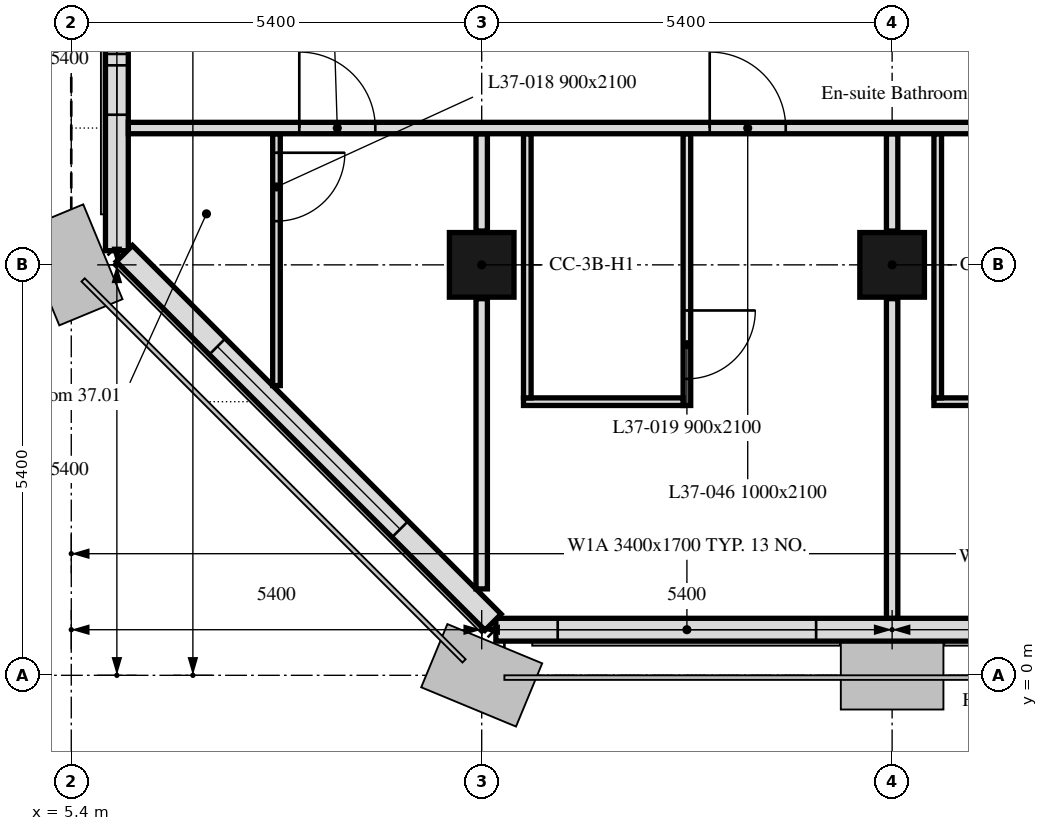
"""IFC4 building model, lengths in metres.
Left out: names, types, materials, properties, quantities, classifications, styles, units other than length and angle.
Written with IfcOpenShell. Run it as: python <this file> out.ifc"""

import sys

from ifc_helpers import new_model, si_unit, direction, frame, frame_2d, origin, origin_2d, place, context, subcontext, project, spatial, rectangle, extrude, element, fill, save


model = new_model("IFC4")
c1 = context("Model", 3, precision=1e-05, world=origin(), true_north=direction((0.0, 1.0)))
c2 = subcontext(c1, "Body", "Model", "MODEL_VIEW")
j1 = project(units=[si_unit("LENGTHUNIT", "METRE"), si_unit("PLANEANGLEUNIT", "RADIAN")], contexts=[c1])
p1 = place(None, origin())
s1 = spatial("IfcSite", under=j1, at=p1, CompositionType="ELEMENT")
p2 = place(p1, origin())
s2 = spatial("IfcBuilding", under=s1, at=p2, CompositionType="ELEMENT")
p3 = place(p2, frame((0.0, 0.0, 159.4)))
s3 = spatial("IfcBuildingStorey", under=s2, at=p3, CompositionType="ELEMENT", Elevation=159.4)
for number, where, z_axis, x_axis in (
    (1, (10.8, 5.4, 0.0), (0.0, 0.0, 1.0), (1.0, 0.0, 0.0)),
    (2, (16.2, 5.4, 0.0), (0.0, 0.0, 1.0), (1.0, 0.0, 0.0)),
):
    element("IfcColumn", number, at=place(p3, frame(where, z_axis=z_axis, x_axis=x_axis)), inside=s3, PredefinedType="COLUMN", context=c2, shape_type="SweptSolid", body=[
        extrude(rectangle(XDim=0.85, YDim=0.85, at=origin_2d()), origin(), (0.0, 0.0, 1.0), 3.0),
    ])
p4 = place(p3, frame((10.986, 0.6, 0.0), z_axis=(0.0, 0.0, 1.0), x_axis=(1.0, 0.0, 0.0)))
e3 = element("IfcWall", 3, at=p4, inside=s3, PredefinedType="SOLIDWALL", context=c2, shape_type="SweptSolid", body=[
    extrude(rectangle(XDim=32.027, YDim=0.3, at=frame_2d((16.014, 0.0))), origin(), (0.0, 0.0, 1.0), 3.0),
])
p5 = place(p4, frame((0.814, 0.0, 0.9)))
e4 = element("IfcOpeningElement", 4, at=p5, cuts=e3, PredefinedType="OPENING", context=c2, shape_type="SweptSolid", body=[
    extrude(rectangle(XDim=3.4, YDim=1.7, at=frame_2d((1.7, 0.85))), frame((0.0, 0.16, 0.0), z_axis=(0.0, -1.0, 0.0), x_axis=(1.0, 0.0, 0.0)), (0.0, 0.0, 1.0), 0.32),
])
p6 = place(p4, frame((6.564, 0.0, 0.9)))
e5 = element("IfcOpeningElement", 5, at=p6, cuts=e3, PredefinedType="OPENING", context=c2, shape_type="SweptSolid", body=[
    extrude(rectangle(XDim=1.1, YDim=1.7, at=frame_2d((0.55, 0.85))), frame((0.0, 0.16, 0.0), z_axis=(0.0, -1.0, 0.0), x_axis=(1.0, 0.0, 0.0)), (0.0, 0.0, 1.0), 0.32),
])
p7 = place(p4, frame((11.614, 0.0, 0.9)))
e6 = element("IfcOpeningElement", 6, at=p7, cuts=e3, PredefinedType="OPENING", context=c2, shape_type="SweptSolid", body=[
    extrude(rectangle(XDim=3.4, YDim=1.7, at=frame_2d((1.7, 0.85))), frame((0.0, 0.16, 0.0), z_axis=(0.0, -1.0, 0.0), x_axis=(1.0, 0.0, 0.0)), (0.0, 0.0, 1.0), 0.32),
])
p8 = place(p4, frame((17.364, 0.0, 0.9)))
e7 = element("IfcOpeningElement", 7, at=p8, cuts=e3, PredefinedType="OPENING", context=c2, shape_type="SweptSolid", body=[
    extrude(rectangle(XDim=1.1, YDim=1.7, at=frame_2d((0.55, 0.85))), frame((0.0, 0.16, 0.0), z_axis=(0.0, -1.0, 0.0), x_axis=(1.0, 0.0, 0.0)), (0.0, 0.0, 1.0), 0.32),
])
p9 = place(p4, frame((22.414, 0.0, 0.9)))
e8 = element("IfcOpeningElement", 8, at=p9, cuts=e3, PredefinedType="OPENING", context=c2, shape_type="SweptSolid", body=[
    extrude(rectangle(XDim=3.4, YDim=1.7, at=frame_2d((1.7, 0.85))), frame((0.0, 0.16, 0.0), z_axis=(0.0, -1.0, 0.0), x_axis=(1.0, 0.0, 0.0)), (0.0, 0.0, 1.0), 0.32),
])
p10 = place(p4, frame((28.164, 0.0, 0.9)))
e9 = element("IfcOpeningElement", 9, at=p10, cuts=e3, PredefinedType="OPENING", context=c2, shape_type="SweptSolid", body=[
    extrude(rectangle(XDim=1.1, YDim=1.7, at=frame_2d((0.55, 0.85))), frame((0.0, 0.16, 0.0), z_axis=(0.0, -1.0, 0.0), x_axis=(1.0, 0.0, 0.0)), (0.0, 0.0, 1.0), 0.32),
])
p11 = place(p3, frame((6.0, 16.2, 0.0), z_axis=(0.0, 0.0, 1.0), x_axis=(0.0, -1.0, 0.0)))
e10 = element("IfcWall", 10, at=p11, inside=s3, PredefinedType="SOLIDWALL", context=c2, shape_type="SweptSolid", body=[
    extrude(rectangle(XDim=10.614, YDim=0.3, at=frame_2d((5.307, 0.0))), origin(), (0.0, 0.0, 1.0), 3.0),
])
p12 = place(p11, frame((1.0, 0.0, 0.9)))
e11 = element("IfcOpeningElement", 11, at=p12, cuts=e10, PredefinedType="OPENING", context=c2, shape_type="SweptSolid", body=[
    extrude(rectangle(XDim=3.4, YDim=1.7, at=frame_2d((1.7, 0.85))), frame((0.0, 0.16, 0.0), z_axis=(0.0, -1.0, 0.0), x_axis=(1.0, 0.0, 0.0)), (0.0, 0.0, 1.0), 0.32),
])
p13 = place(p11, frame((7.375, 0.0, 0.9)))
e12 = element("IfcOpeningElement", 12, at=p13, cuts=e10, PredefinedType="OPENING", context=c2, shape_type="SweptSolid", body=[
    extrude(rectangle(XDim=0.65, YDim=1.7, at=frame_2d((0.325, 0.85))), frame((0.0, 0.16, 0.0), z_axis=(0.0, -1.0, 0.0), x_axis=(1.0, 0.0, 0.0)), (0.0, 0.0, 1.0), 0.32),
])
p14 = place(p11, frame((8.175, 0.0, 0.9)))
e13 = element("IfcOpeningElement", 13, at=p14, cuts=e10, PredefinedType="OPENING", context=c2, shape_type="SweptSolid", body=[
    extrude(rectangle(XDim=0.65, YDim=1.7, at=frame_2d((0.325, 0.85))), frame((0.0, 0.16, 0.0), z_axis=(0.0, -1.0, 0.0), x_axis=(1.0, 0.0, 0.0)), (0.0, 0.0, 1.0), 0.32),
])
p15 = place(p3, frame((6.099, 5.55, 0.0), z_axis=(0.0, 0.0, 1.0), x_axis=(0.707106781187, -0.707106781187, 0.0)))
e14 = element("IfcWall", 14, at=p15, inside=s3, PredefinedType="SOLIDWALL", context=c2, shape_type="SweptSolid", body=[
    extrude(rectangle(XDim=6.86, YDim=0.3, at=frame_2d((3.43, 0.0))), origin(), (0.0, 0.0, 1.0), 3.0),
])
p16 = place(p15, frame((1.73, 0.0, 0.9)))
e15 = element("IfcOpeningElement", 15, at=p16, cuts=e14, PredefinedType="OPENING", context=c2, shape_type="SweptSolid", body=[
    extrude(rectangle(XDim=3.4, YDim=1.7, at=frame_2d((1.7, 0.85))), frame((0.0, 0.16, 0.0), z_axis=(0.0, -1.0, 0.0), x_axis=(1.0, 0.0, 0.0)), (0.0, 0.0, 1.0), 0.32),
])
p17 = place(p3, frame((10.8, 1.137, 0.0), z_axis=(0.0, 0.0, 1.0), x_axis=(0.0, 1.0, 0.0)))
e16 = element("IfcWall", 16, at=p17, inside=s3, PredefinedType="PARTITIONING", context=c2, shape_type="SweptSolid", body=[
    extrude(rectangle(XDim=3.818, YDim=0.15, at=frame_2d((1.909, 0.0))), origin(), (0.0, 0.0, 1.0), 3.0),
])
p18 = place(p3, frame((10.8, 5.845, 0.0), z_axis=(0.0, 0.0, 1.0), x_axis=(0.0, 1.0, 0.0)))
e17 = element("IfcWall", 17, at=p18, inside=s3, PredefinedType="PARTITIONING", context=c2, shape_type="SweptSolid", body=[
    extrude(rectangle(XDim=1.28, YDim=0.15, at=frame_2d((0.64, 0.0))), origin(), (0.0, 0.0, 1.0), 3.0),
])
p19 = place(p3, frame((8.1, 7.125, 0.0), z_axis=(0.0, 0.0, 1.0), x_axis=(0.0, -1.0, 0.0)))
e18 = element("IfcWall", 18, at=p19, inside=s3, PredefinedType="PARTITIONING", context=c2, shape_type="SweptSolid", body=[
    extrude(rectangle(XDim=3.313, YDim=0.1, at=frame_2d((1.656, 0.0))), origin(), (0.0, 0.0, 1.0), 3.0),
])
p20 = place(p19, frame((0.25, 0.0, 0.0)))
e19 = element("IfcOpeningElement", 19, at=p20, cuts=e18, PredefinedType="OPENING", context=c2, shape_type="SweptSolid", body=[
    extrude(rectangle(XDim=0.9, YDim=2.1, at=frame_2d((0.45, 1.05))), frame((0.0, 0.05, 0.0), z_axis=(0.0, -1.0, 0.0), x_axis=(1.0, 0.0, 0.0)), (0.0, 0.0, 1.0), 0.1),
])
p21 = place(p3, frame((16.2, 0.751, 0.0), z_axis=(0.0, 0.0, 1.0), x_axis=(0.0, 1.0, 0.0)))
e20 = element("IfcWall", 20, at=p21, inside=s3, PredefinedType="PARTITIONING", context=c2, shape_type="SweptSolid", body=[
    extrude(rectangle(XDim=4.204, YDim=0.15, at=frame_2d((2.102, 0.0))), origin(), (0.0, 0.0, 1.0), 2.4),
])
p22 = place(p3, frame((16.2, 5.845, 0.0), z_axis=(0.0, 0.0, 1.0), x_axis=(0.0, 1.0, 0.0)))
e21 = element("IfcWall", 21, at=p22, inside=s3, PredefinedType="PARTITIONING", context=c2, shape_type="SweptSolid", body=[
    extrude(rectangle(XDim=1.28, YDim=0.15, at=frame_2d((0.64, 0.0))), origin(), (0.0, 0.0, 1.0), 2.4),
])
p23 = place(p3, frame((13.5, 7.125, 0.0), z_axis=(0.0, 0.0, 1.0), x_axis=(0.0, -1.0, 0.0)))
e22 = element("IfcWall", 22, at=p23, inside=s3, PredefinedType="PARTITIONING", context=c2, shape_type="SweptSolid", body=[
    extrude(rectangle(XDim=3.575, YDim=0.1, at=frame_2d((1.788, 0.0))), origin(), (0.0, 0.0, 1.0), 3.0),
])
p24 = place(p23, frame((2.325, 0.0, 0.0)))
e23 = element("IfcOpeningElement", 23, at=p24, cuts=e22, PredefinedType="OPENING", context=c2, shape_type="SweptSolid", body=[
    extrude(rectangle(XDim=0.9, YDim=2.1, at=frame_2d((0.45, 1.05))), frame((0.0, 0.05, 0.0), z_axis=(0.0, -1.0, 0.0), x_axis=(1.0, 0.0, 0.0)), (0.0, 0.0, 1.0), 0.1),
])
p25 = place(p3, frame((13.45, 3.6, 0.0), z_axis=(0.0, 0.0, 1.0), x_axis=(-1.0, 0.0, 0.0)))
e24 = element("IfcWall", 24, at=p25, inside=s3, PredefinedType="PARTITIONING", context=c2, shape_type="SweptSolid", body=[
    extrude(rectangle(XDim=2.1, YDim=0.1, at=frame_2d((1.05, 0.0))), origin(), (0.0, 0.0, 1.0), 3.0),
])
p26 = place(p3, frame((11.4, 3.65, 0.0), z_axis=(0.0, 0.0, 1.0), x_axis=(0.0, 1.0, 0.0)))
e25 = element("IfcWall", 25, at=p26, inside=s3, PredefinedType="PARTITIONING", context=c2, shape_type="SweptSolid", body=[
    extrude(rectangle(XDim=3.475, YDim=0.1, at=frame_2d((1.738, 0.0))), origin(), (0.0, 0.0, 1.0), 3.0),
])
p27 = place(p3, frame((18.85, 3.6, 0.0), z_axis=(0.0, 0.0, 1.0), x_axis=(-1.0, 0.0, 0.0)))
e26 = element("IfcWall", 26, at=p27, inside=s3, PredefinedType="PARTITIONING", context=c2, shape_type="SweptSolid", body=[
    extrude(rectangle(XDim=2.1, YDim=0.1, at=frame_2d((1.05, 0.0))), origin(), (0.0, 0.0, 1.0), 3.0),
])
p28 = place(p3, frame((16.8, 3.65, 0.0), z_axis=(0.0, 0.0, 1.0), x_axis=(0.0, 1.0, 0.0)))
e27 = element("IfcWall", 27, at=p28, inside=s3, PredefinedType="PARTITIONING", context=c2, shape_type="SweptSolid", body=[
    extrude(rectangle(XDim=3.475, YDim=0.1, at=frame_2d((1.738, 0.0))), origin(), (0.0, 0.0, 1.0), 3.0),
])
p29 = place(p3, frame((6.151, 7.2, 0.0), z_axis=(0.0, 0.0, 1.0), x_axis=(1.0, 0.0, 0.0)))
e28 = element("IfcWall", 28, at=p29, inside=s3, PredefinedType="PARTITIONING", context=c2, shape_type="SweptSolid", body=[
    extrude(rectangle(XDim=41.698, YDim=0.15, at=frame_2d((20.849, 0.0))), origin(), (0.0, 0.0, 1.0), 2.4),
])
p30 = place(p29, frame((2.249, 0.0, 0.0)))
e29 = element("IfcOpeningElement", 29, at=p30, cuts=e28, PredefinedType="OPENING", context=c2, shape_type="SweptSolid", body=[
    extrude(rectangle(XDim=1.0, YDim=2.1, at=frame_2d((0.5, 1.05))), frame((0.0, 0.075, 0.0), z_axis=(0.0, -1.0, 0.0), x_axis=(1.0, 0.0, 0.0)), (0.0, 0.0, 1.0), 0.15),
])
p31 = place(p29, frame((7.649, 0.0, 0.0)))
e30 = element("IfcOpeningElement", 30, at=p31, cuts=e28, PredefinedType="OPENING", context=c2, shape_type="SweptSolid", body=[
    extrude(rectangle(XDim=1.0, YDim=2.1, at=frame_2d((0.5, 1.05))), frame((0.0, 0.075, 0.0), z_axis=(0.0, -1.0, 0.0), x_axis=(1.0, 0.0, 0.0)), (0.0, 0.0, 1.0), 0.15),
])
p32 = place(p29, frame((13.049, 0.0, 0.0)))
e31 = element("IfcOpeningElement", 31, at=p32, cuts=e28, PredefinedType="OPENING", context=c2, shape_type="SweptSolid", body=[
    extrude(rectangle(XDim=1.0, YDim=2.1, at=frame_2d((0.5, 1.05))), frame((0.0, 0.075, 0.0), z_axis=(0.0, -1.0, 0.0), x_axis=(1.0, 0.0, 0.0)), (0.0, 0.0, 1.0), 0.15),
])
p33 = place(p29, frame((18.449, 0.0, 0.0)))
e32 = element("IfcOpeningElement", 32, at=p33, cuts=e28, PredefinedType="OPENING", context=c2, shape_type="SweptSolid", body=[
    extrude(rectangle(XDim=1.0, YDim=2.1, at=frame_2d((0.5, 1.05))), frame((0.0, 0.075, 0.0), z_axis=(0.0, -1.0, 0.0), x_axis=(1.0, 0.0, 0.0)), (0.0, 0.0, 1.0), 0.15),
])
p34 = place(p29, frame((23.849, 0.0, 0.0)))
e33 = element("IfcOpeningElement", 33, at=p34, cuts=e28, PredefinedType="OPENING", context=c2, shape_type="SweptSolid", body=[
    extrude(rectangle(XDim=1.0, YDim=2.1, at=frame_2d((0.5, 1.05))), frame((0.0, 0.075, 0.0), z_axis=(0.0, -1.0, 0.0), x_axis=(1.0, 0.0, 0.0)), (0.0, 0.0, 1.0), 0.15),
])
p35 = place(p29, frame((29.249, 0.0, 0.0)))
e34 = element("IfcOpeningElement", 34, at=p35, cuts=e28, PredefinedType="OPENING", context=c2, shape_type="SweptSolid", body=[
    extrude(rectangle(XDim=1.0, YDim=2.1, at=frame_2d((0.5, 1.05))), frame((0.0, 0.075, 0.0), z_axis=(0.0, -1.0, 0.0), x_axis=(1.0, 0.0, 0.0)), (0.0, 0.0, 1.0), 0.15),
])
p36 = place(p29, frame((37.599, 0.0, 0.0)))
e35 = element("IfcOpeningElement", 35, at=p36, cuts=e28, PredefinedType="OPENING", context=c2, shape_type="SweptSolid", body=[
    extrude(rectangle(XDim=1.0, YDim=2.1, at=frame_2d((0.5, 1.05))), frame((0.0, 0.075, 0.0), z_axis=(0.0, -1.0, 0.0), x_axis=(1.0, 0.0, 0.0)), (0.0, 0.0, 1.0), 0.15),
])
p37 = place(p5, origin())
e36 = element("IfcWindow", 36, at=p37, inside=s3, PartitioningType="SINGLE_PANEL", PredefinedType="WINDOW", context=c2, shape_type="SweptSolid", body=[
    extrude(rectangle(XDim=3.4, YDim=1.7, at=frame_2d((1.7, 0.85))), frame((0.0, 0.03, 0.0), z_axis=(0.0, -1.0, 0.0), x_axis=(1.0, 0.0, 0.0)), (0.0, 0.0, 1.0), 0.06),
])
fill(e4, e36)
p38 = place(p13, origin())
e37 = element("IfcWindow", 37, at=p38, inside=s3, PartitioningType="SINGLE_PANEL", PredefinedType="WINDOW", context=c2, shape_type="SweptSolid", body=[
    extrude(rectangle(XDim=0.65, YDim=1.7, at=frame_2d((0.325, 0.85))), frame((0.0, 0.03, 0.0), z_axis=(0.0, -1.0, 0.0), x_axis=(1.0, 0.0, 0.0)), (0.0, 0.0, 1.0), 0.06),
])
fill(e12, e37)
p39 = place(p14, origin())
e38 = element("IfcWindow", 38, at=p39, inside=s3, PartitioningType="SINGLE_PANEL", PredefinedType="WINDOW", context=c2, shape_type="SweptSolid", body=[
    extrude(rectangle(XDim=0.65, YDim=1.7, at=frame_2d((0.325, 0.85))), frame((0.0, 0.03, 0.0), z_axis=(0.0, -1.0, 0.0), x_axis=(1.0, 0.0, 0.0)), (0.0, 0.0, 1.0), 0.06),
])
fill(e13, e38)
p40 = place(p16, origin())
e39 = element("IfcWindow", 39, at=p40, inside=s3, PartitioningType="SINGLE_PANEL", PredefinedType="WINDOW", context=c2, shape_type="SweptSolid", body=[
    extrude(rectangle(XDim=3.4, YDim=1.7, at=frame_2d((1.7, 0.85))), frame((0.0, 0.03, 0.0), z_axis=(0.0, -1.0, 0.0), x_axis=(1.0, 0.0, 0.0)), (0.0, 0.0, 1.0), 0.06),
])
fill(e15, e39)
p41 = place(p20, origin())
e40 = element("IfcDoor", 40, at=p41, inside=s3, OperationType="SINGLE_SWING_LEFT", PredefinedType="DOOR", context=c2, shape_type="SweptSolid", body=[
    extrude(rectangle(XDim=0.9, YDim=2.1, at=frame_2d((0.45, 1.05))), frame((0.0, 0.025, 0.0), z_axis=(0.0, -1.0, 0.0), x_axis=(1.0, 0.0, 0.0)), (0.0, 0.0, 1.0), 0.05),
])
fill(e19, e40)
p42 = place(p24, origin())
e41 = element("IfcDoor", 41, at=p42, inside=s3, OperationType="SINGLE_SWING_LEFT", PredefinedType="DOOR", context=c2, shape_type="SweptSolid", body=[
    extrude(rectangle(XDim=0.9, YDim=2.1, at=frame_2d((0.45, 1.05))), frame((0.0, 0.025, 0.0), z_axis=(0.0, -1.0, 0.0), x_axis=(1.0, 0.0, 0.0)), (0.0, 0.0, 1.0), 0.05),
])
fill(e23, e41)
p43 = place(p30, origin())
e42 = element("IfcDoor", 42, at=p43, inside=s3, OperationType="SINGLE_SWING_LEFT", PredefinedType="DOOR", context=c2, shape_type="SweptSolid", body=[
    extrude(rectangle(XDim=1.0, YDim=2.1, at=frame_2d((0.5, 1.05))), frame((0.0, 0.025, 0.0), z_axis=(0.0, -1.0, 0.0), x_axis=(1.0, 0.0, 0.0)), (0.0, 0.0, 1.0), 0.05),
])
fill(e29, e42)
p44 = place(p31, origin())
e43 = element("IfcDoor", 43, at=p44, inside=s3, OperationType="SINGLE_SWING_RIGHT", PredefinedType="DOOR", context=c2, shape_type="SweptSolid", body=[
    extrude(rectangle(XDim=1.0, YDim=2.1, at=frame_2d((0.5, 1.05))), frame((0.0, 0.025, 0.0), z_axis=(0.0, -1.0, 0.0), x_axis=(1.0, 0.0, 0.0)), (0.0, 0.0, 1.0), 0.05),
])
fill(e30, e43)
save(model, sys.argv[1])
